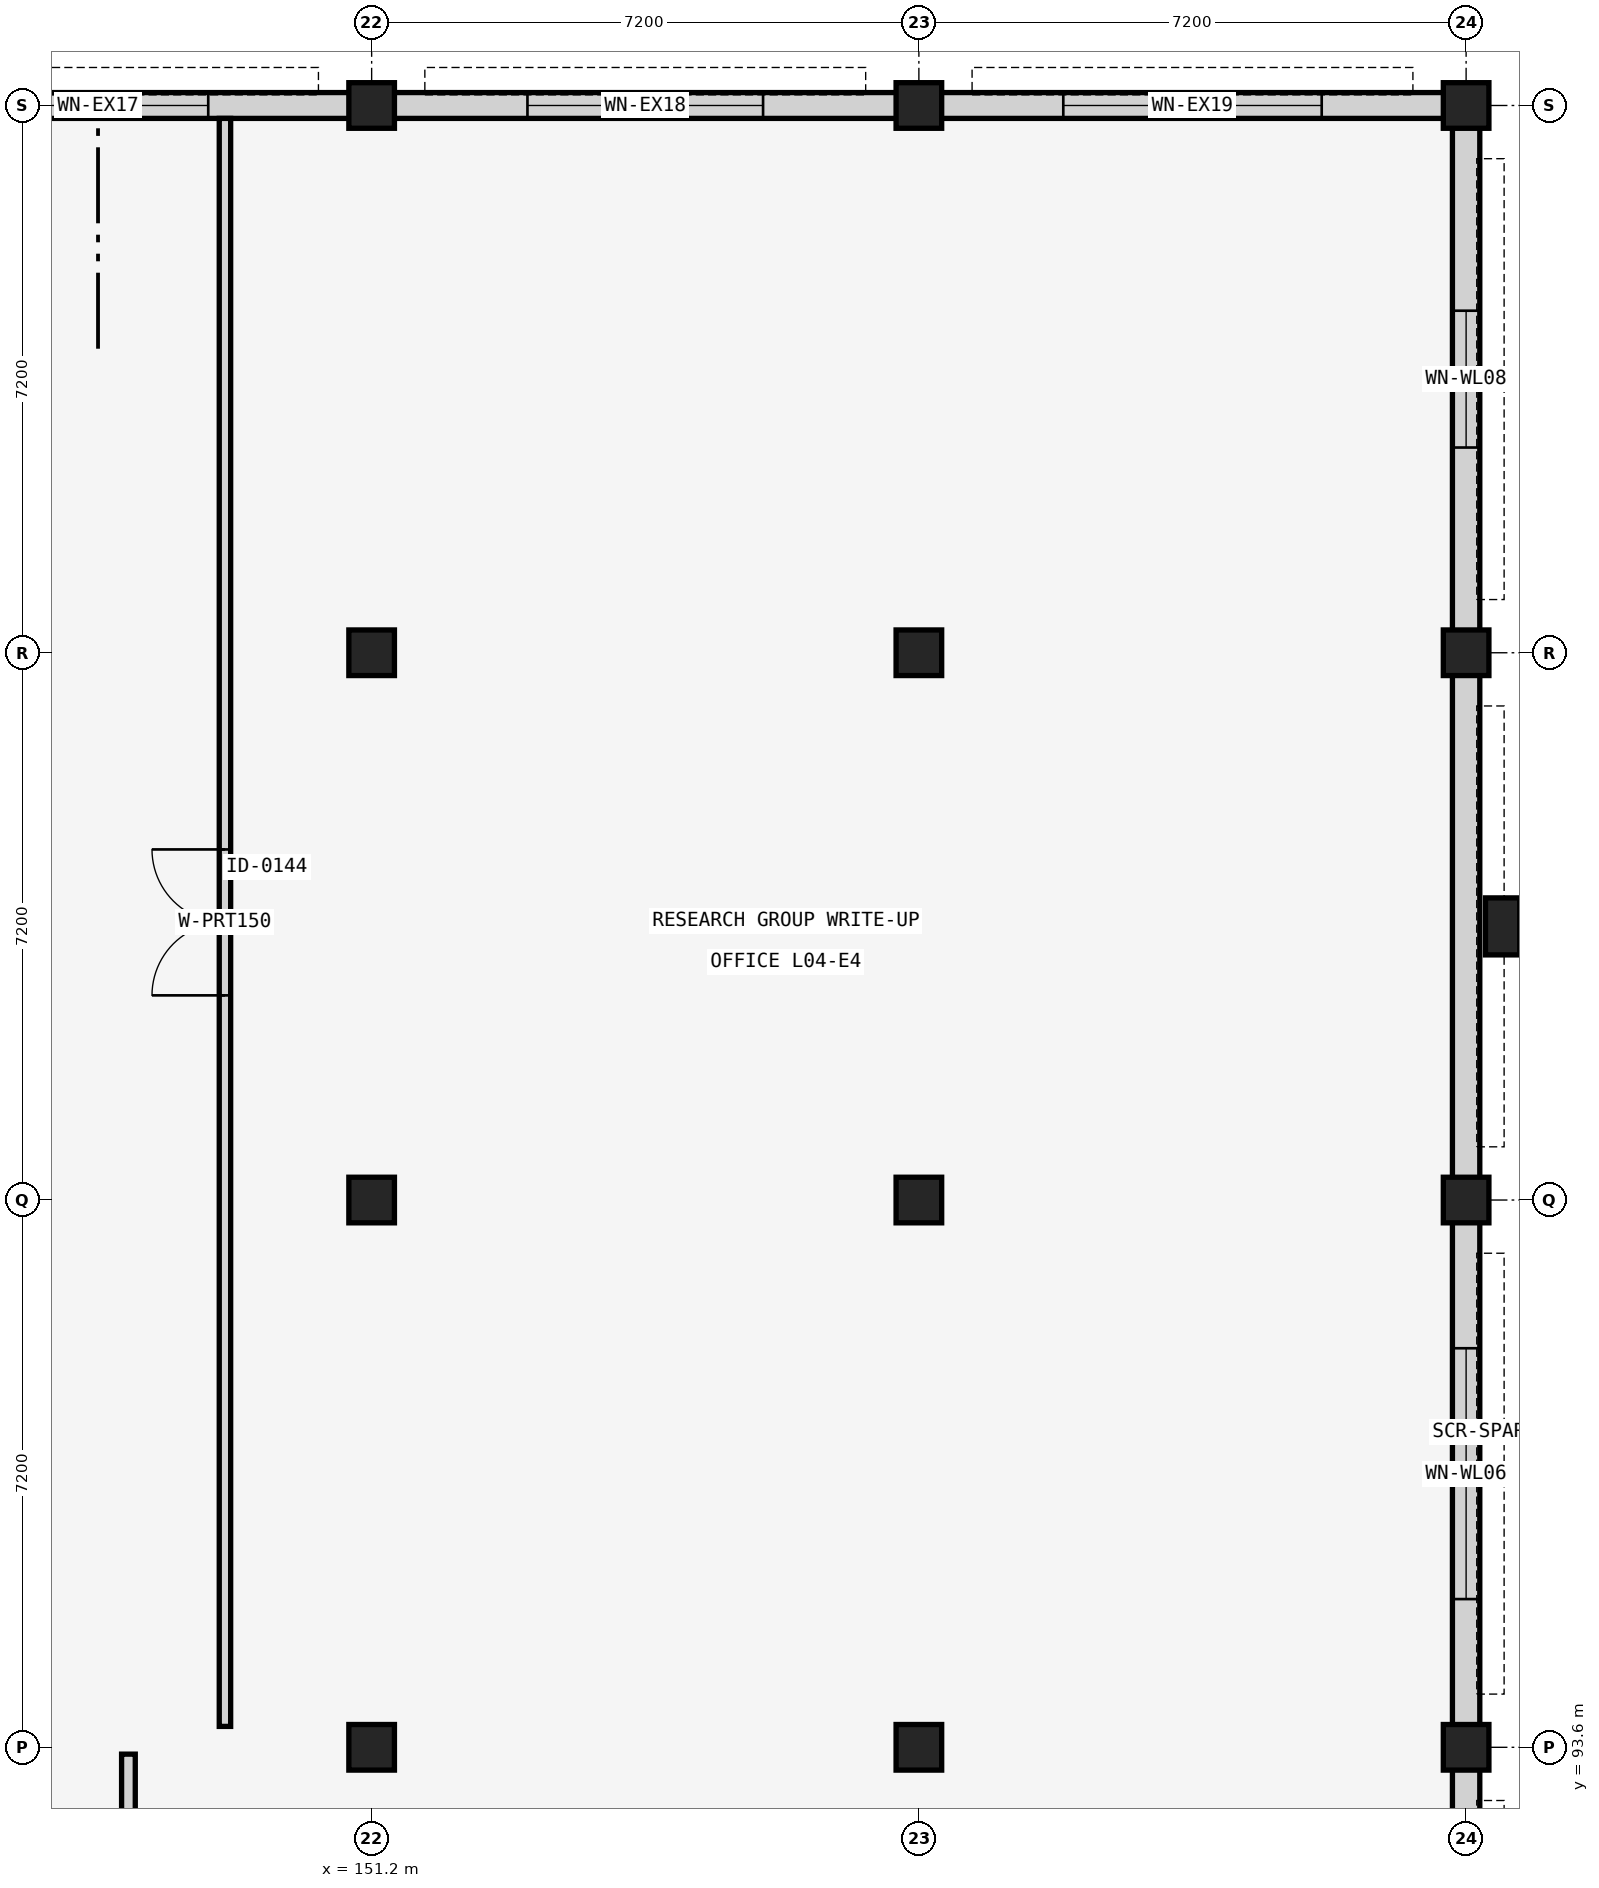
"""IFC4 building model, lengths in metres.
Left out: names, types, materials, properties, quantities, classifications, styles, units other than length and angle.
Written with IfcOpenShell. Run it as: python <this file> out.ifc"""

import sys

from ifc_helpers import new_model, si_unit, direction, frame, frame_2d, origin, origin_2d, place, context, subcontext, project, spatial, rectangle, extrude, element, fill, save


model = new_model("IFC4")
c1 = context("Model", 3, precision=1e-05, world=origin(), true_north=direction((0.0, 1.0)))
c2 = subcontext(c1, "Body", "Model", "MODEL_VIEW")
j1 = project(units=[si_unit("LENGTHUNIT", "METRE"), si_unit("PLANEANGLEUNIT", "RADIAN")], contexts=[c1])
p1 = place(None, origin())
s1 = spatial("IfcSite", under=j1, at=p1, CompositionType="ELEMENT")
p2 = place(p1, origin())
s2 = spatial("IfcBuilding", under=s1, at=p2, CompositionType="ELEMENT")
p3 = place(p2, frame((0.0, 0.0, 17.28)))
s3 = spatial("IfcBuildingStorey", under=s2, at=p3, CompositionType="ELEMENT", Elevation=17.28)
for number, where, z_axis, x_axis in (
    (1, (151.2, 93.6, 0.0), (0.0, 0.0, 1.0), (1.0, 0.0, 0.0)),
    (2, (151.2, 100.8, 0.0), (0.0, 0.0, 1.0), (1.0, 0.0, 0.0)),
    (3, (151.2, 108.0, 0.0), (0.0, 0.0, 1.0), (1.0, 0.0, 0.0)),
    (4, (151.2, 115.2, 0.0), (0.0, 0.0, 1.0), (1.0, 0.0, 0.0)),
    (5, (158.4, 93.6, 0.0), (0.0, 0.0, 1.0), (1.0, 0.0, 0.0)),
    (6, (158.4, 100.8, 0.0), (0.0, 0.0, 1.0), (1.0, 0.0, 0.0)),
    (7, (158.4, 108.0, 0.0), (0.0, 0.0, 1.0), (1.0, 0.0, 0.0)),
    (8, (158.4, 115.2, 0.0), (0.0, 0.0, 1.0), (1.0, 0.0, 0.0)),
    (9, (165.6, 93.6, 0.0), (0.0, 0.0, 1.0), (1.0, 0.0, 0.0)),
    (10, (165.6, 100.8, 0.0), (0.0, 0.0, 1.0), (1.0, 0.0, 0.0)),
    (11, (165.6, 108.0, 0.0), (0.0, 0.0, 1.0), (1.0, 0.0, 0.0)),
    (12, (165.6, 115.2, 0.0), (0.0, 0.0, 1.0), (1.0, 0.0, 0.0)),
):
    element("IfcColumn", number, at=place(p3, frame(where, z_axis=z_axis, x_axis=x_axis)), inside=s3, PredefinedType="COLUMN", context=c2, shape_type="SweptSolid", body=[
        extrude(rectangle(XDim=0.6, YDim=0.6, at=origin_2d()), origin(), (0.0, 0.0, 1.0), 4.16),
    ])
p4 = place(p3, frame((166.08, 104.4, 0.0), z_axis=(0.0, 0.0, 1.0), x_axis=(1.0, 0.0, 0.0)))
e13 = element("IfcColumn", 13, at=p4, inside=s3, PredefinedType="PILASTER", context=c2, shape_type="SweptSolid", body=[
    extrude(rectangle(XDim=0.45, YDim=0.75, at=origin_2d()), origin(), (0.0, 0.0, 1.0), 4.16),
])
p5 = place(p3, frame((165.6, 86.69, 0.0), z_axis=(0.0, 0.0, 1.0), x_axis=(0.0, 1.0, 0.0)))
e14 = element("IfcWall", 14, at=p5, inside=s3, PredefinedType="SOLIDWALL", context=c2, shape_type="SweptSolid", body=[
    extrude(rectangle(XDim=6.62, YDim=0.36, at=frame_2d((3.31, 0.0))), origin(), (0.0, 0.0, 1.0), 3.16),
])
p6 = place(p5, frame((1.81, 0.0, 0.9)))
e15 = element("IfcOpeningElement", 15, at=p6, cuts=e14, PredefinedType="OPENING", context=c2, shape_type="SweptSolid", body=[
    extrude(rectangle(XDim=3.0, YDim=2.1, at=frame_2d((1.5, 1.05))), frame((0.0, 0.19, 0.0), z_axis=(0.0, -1.0, 0.0), x_axis=(1.0, 0.0, 0.0)), (0.0, 0.0, 1.0), 0.38),
])
p7 = place(p3, frame((165.6, 93.89, 0.0), z_axis=(0.0, 0.0, 1.0), x_axis=(0.0, 1.0, 0.0)))
e16 = element("IfcWall", 16, at=p7, inside=s3, PredefinedType="SOLIDWALL", context=c2, shape_type="SweptSolid", body=[
    extrude(rectangle(XDim=6.62, YDim=0.36, at=frame_2d((3.31, 0.0))), origin(), (0.0, 0.0, 1.0), 3.16),
])
p8 = place(p7, frame((1.66, 0.0, 0.9)))
e17 = element("IfcOpeningElement", 17, at=p8, cuts=e16, PredefinedType="OPENING", context=c2, shape_type="SweptSolid", body=[
    extrude(rectangle(XDim=3.3, YDim=2.1, at=frame_2d((1.65, 1.05))), frame((0.0, 0.19, 0.0), z_axis=(0.0, -1.0, 0.0), x_axis=(1.0, 0.0, 0.0)), (0.0, 0.0, 1.0), 0.38),
])
p9 = place(p3, frame((165.6, 101.09, 0.0), z_axis=(0.0, 0.0, 1.0), x_axis=(0.0, 1.0, 0.0)))
e18 = element("IfcWall", 18, at=p9, inside=s3, PredefinedType="SOLIDWALL", context=c2, shape_type="SweptSolid", body=[
    extrude(rectangle(XDim=6.62, YDim=0.36, at=frame_2d((3.31, 0.0))), origin(), (0.0, 0.0, 1.0), 3.16),
])
p10 = place(p3, frame((165.6, 108.29, 0.0), z_axis=(0.0, 0.0, 1.0), x_axis=(0.0, 1.0, 0.0)))
e19 = element("IfcWall", 19, at=p10, inside=s3, PredefinedType="SOLIDWALL", context=c2, shape_type="SweptSolid", body=[
    extrude(rectangle(XDim=6.62, YDim=0.36, at=frame_2d((3.31, 0.0))), origin(), (0.0, 0.0, 1.0), 3.16),
])
p11 = place(p10, frame((2.41, 0.0, 0.95)))
e20 = element("IfcOpeningElement", 20, at=p11, cuts=e19, PredefinedType="OPENING", context=c2, shape_type="SweptSolid", body=[
    extrude(rectangle(XDim=1.8, YDim=1.8, at=frame_2d((0.9, 0.9))), frame((0.0, 0.19, 0.0), z_axis=(0.0, -1.0, 0.0), x_axis=(1.0, 0.0, 0.0)), (0.0, 0.0, 1.0), 0.38),
])
p12 = place(p3, frame((144.29, 115.2, 0.0), z_axis=(0.0, 0.0, 1.0), x_axis=(1.0, 0.0, 0.0)))
e21 = element("IfcWall", 21, at=p12, inside=s3, PredefinedType="SOLIDWALL", context=c2, shape_type="SweptSolid", body=[
    extrude(rectangle(XDim=6.62, YDim=0.34, at=frame_2d((3.31, 0.0))), origin(), (0.0, 0.0, 1.0), 3.21),
])
p13 = place(p12, frame((1.86, 0.0, 0.95)))
e22 = element("IfcOpeningElement", 22, at=p13, cuts=e21, PredefinedType="OPENING", context=c2, shape_type="SweptSolid", body=[
    extrude(rectangle(XDim=2.9, YDim=1.75, at=frame_2d((1.45, 0.875))), frame((0.0, 0.18, 0.0), z_axis=(0.0, -1.0, 0.0), x_axis=(1.0, 0.0, 0.0)), (0.0, 0.0, 1.0), 0.36),
])
p14 = place(p3, frame((151.49, 115.2, 0.0), z_axis=(0.0, 0.0, 1.0), x_axis=(1.0, 0.0, 0.0)))
e23 = element("IfcWall", 23, at=p14, inside=s3, PredefinedType="SOLIDWALL", context=c2, shape_type="SweptSolid", body=[
    extrude(rectangle(XDim=6.62, YDim=0.34, at=frame_2d((3.31, 0.0))), origin(), (0.0, 0.0, 1.0), 3.21),
])
p15 = place(p14, frame((1.76, 0.0, 0.95)))
e24 = element("IfcOpeningElement", 24, at=p15, cuts=e23, PredefinedType="OPENING", context=c2, shape_type="SweptSolid", body=[
    extrude(rectangle(XDim=3.1, YDim=1.75, at=frame_2d((1.55, 0.875))), frame((0.0, 0.18, 0.0), z_axis=(0.0, -1.0, 0.0), x_axis=(1.0, 0.0, 0.0)), (0.0, 0.0, 1.0), 0.36),
])
p16 = place(p3, frame((158.69, 115.2, 0.0), z_axis=(0.0, 0.0, 1.0), x_axis=(1.0, 0.0, 0.0)))
e25 = element("IfcWall", 25, at=p16, inside=s3, PredefinedType="SOLIDWALL", context=c2, shape_type="SweptSolid", body=[
    extrude(rectangle(XDim=6.62, YDim=0.34, at=frame_2d((3.31, 0.0))), origin(), (0.0, 0.0, 1.0), 3.21),
])
p17 = place(p16, frame((1.61, 0.0, 0.95)))
e26 = element("IfcOpeningElement", 26, at=p17, cuts=e25, PredefinedType="OPENING", context=c2, shape_type="SweptSolid", body=[
    extrude(rectangle(XDim=3.4, YDim=1.75, at=frame_2d((1.7, 0.875))), frame((0.0, 0.18, 0.0), z_axis=(0.0, -1.0, 0.0), x_axis=(1.0, 0.0, 0.0)), (0.0, 0.0, 1.0), 0.36),
])
p18 = place(p3, frame((148.0, 71.89, 0.0), z_axis=(0.0, 0.0, 1.0), x_axis=(0.0, 1.0, 0.0)))
e27 = element("IfcWall", 27, at=p18, inside=s3, PredefinedType="PARTITIONING", context=c2, shape_type="SweptSolid", body=[
    extrude(rectangle(XDim=21.62, YDim=0.18, at=frame_2d((10.81, 0.0))), origin(), (0.0, 0.0, 1.0), 3.16),
])
p19 = place(p18, frame((9.89, 0.0, 0.0)))
e28 = element("IfcOpeningElement", 28, at=p19, cuts=e27, PredefinedType="OPENING", context=c2, shape_type="SweptSolid", body=[
    extrude(rectangle(XDim=1.84, YDim=2.26, at=frame_2d((0.92, 1.13))), frame((0.0, 0.1, 0.0), z_axis=(0.0, -1.0, 0.0), x_axis=(1.0, 0.0, 0.0)), (0.0, 0.0, 1.0), 0.2),
])
p20 = place(p3, frame((149.27, 93.875, 0.0), z_axis=(0.0, 0.0, 1.0), x_axis=(0.0, 1.0, 0.0)))
e29 = element("IfcWall", 29, at=p20, inside=s3, PredefinedType="PARTITIONING", context=c2, shape_type="SweptSolid", body=[
    extrude(rectangle(XDim=21.155, YDim=0.15, at=frame_2d((10.578, 0.0))), origin(), (0.0, 0.0, 1.0), 3.16),
])
p21 = place(p20, frame((9.617, 0.0, 0.0)))
e30 = element("IfcOpeningElement", 30, at=p21, cuts=e29, PredefinedType="OPENING", context=c2, shape_type="SweptSolid", body=[
    extrude(rectangle(XDim=1.92, YDim=2.28, at=frame_2d((0.96, 1.14))), frame((0.0, 0.085, 0.0), z_axis=(0.0, -1.0, 0.0), x_axis=(1.0, 0.0, 0.0)), (0.0, 0.0, 1.0), 0.17),
])
p22 = place(p8, origin())
e31 = element("IfcWindow", 31, at=p22, inside=s3, PartitioningType="SINGLE_PANEL", PredefinedType="WINDOW", context=c2, shape_type="SweptSolid", body=[
    extrude(rectangle(XDim=3.3, YDim=2.1, at=frame_2d((1.65, 1.05))), frame((0.0, 0.03, 0.0), z_axis=(0.0, -1.0, 0.0), x_axis=(1.0, 0.0, 0.0)), (0.0, 0.0, 1.0), 0.06),
])
fill(e17, e31)
p23 = place(p11, origin())
e32 = element("IfcWindow", 32, at=p23, inside=s3, PartitioningType="SINGLE_PANEL", PredefinedType="WINDOW", context=c2, shape_type="SweptSolid", body=[
    extrude(rectangle(XDim=1.8, YDim=1.8, at=frame_2d((0.9, 0.9))), frame((0.0, 0.03, 0.0), z_axis=(0.0, -1.0, 0.0), x_axis=(1.0, 0.0, 0.0)), (0.0, 0.0, 1.0), 0.06),
])
fill(e20, e32)
p24 = place(p13, origin())
e33 = element("IfcWindow", 33, at=p24, inside=s3, PartitioningType="SINGLE_PANEL", PredefinedType="WINDOW", context=c2, shape_type="SweptSolid", body=[
    extrude(rectangle(XDim=2.9, YDim=1.75, at=frame_2d((1.45, 0.875))), frame((0.0, 0.03, 0.0), z_axis=(0.0, -1.0, 0.0), x_axis=(1.0, 0.0, 0.0)), (0.0, 0.0, 1.0), 0.06),
])
fill(e22, e33)
p25 = place(p15, origin())
e34 = element("IfcWindow", 34, at=p25, inside=s3, PartitioningType="SINGLE_PANEL", PredefinedType="WINDOW", context=c2, shape_type="SweptSolid", body=[
    extrude(rectangle(XDim=3.1, YDim=1.75, at=frame_2d((1.55, 0.875))), frame((0.0, 0.03, 0.0), z_axis=(0.0, -1.0, 0.0), x_axis=(1.0, 0.0, 0.0)), (0.0, 0.0, 1.0), 0.06),
])
fill(e24, e34)
p26 = place(p17, origin())
e35 = element("IfcWindow", 35, at=p26, inside=s3, PartitioningType="SINGLE_PANEL", PredefinedType="WINDOW", context=c2, shape_type="SweptSolid", body=[
    extrude(rectangle(XDim=3.4, YDim=1.75, at=frame_2d((1.7, 0.875))), frame((0.0, 0.03, 0.0), z_axis=(0.0, -1.0, 0.0), x_axis=(1.0, 0.0, 0.0)), (0.0, 0.0, 1.0), 0.06),
])
fill(e26, e35)
p27 = place(p21, origin())
e36 = element("IfcDoor", 36, at=p27, inside=s3, OperationType="DOUBLE_DOOR_SINGLE_SWING", PredefinedType="DOOR", context=c2, shape_type="SweptSolid", body=[
    extrude(rectangle(XDim=1.92, YDim=2.28, at=frame_2d((0.96, 1.14))), frame((0.0, 0.025, 0.0), z_axis=(0.0, -1.0, 0.0), x_axis=(1.0, 0.0, 0.0)), (0.0, 0.0, 1.0), 0.05),
])
fill(e30, e36)
save(model, sys.argv[1])
